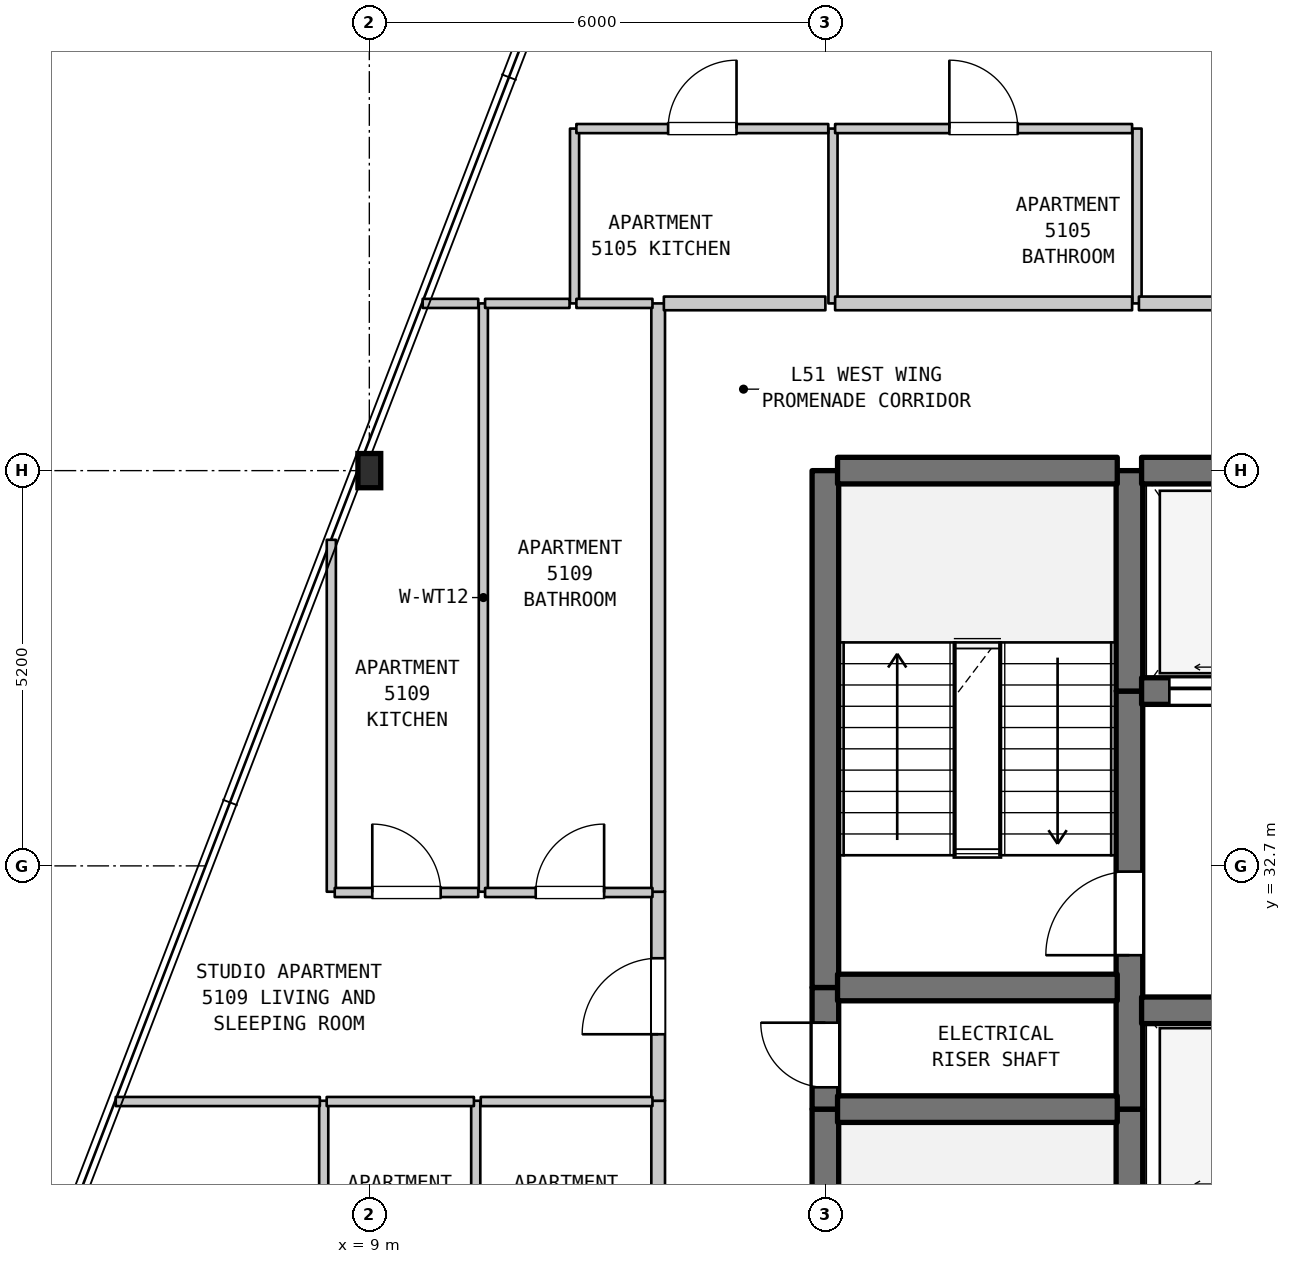
"""IFC4 building model, lengths in metres.
Left out: names, types, materials, properties, quantities, classifications, styles, units other than length and angle.
Written with IfcOpenShell. Run it as: python <this file> out.ifc"""

import sys

from ifc_helpers import new_model, si_unit, direction, frame, frame_2d, origin, origin_2d, place, context, subcontext, project, spatial, rectangle, i_section, extrude, element, fill, save


model = new_model("IFC4")
c1 = context("Model", 3, precision=1e-05, world=origin(), true_north=direction((0.0, 1.0)))
c2 = subcontext(c1, "Body", "Model", "MODEL_VIEW")
j1 = project(units=[si_unit("LENGTHUNIT", "METRE"), si_unit("PLANEANGLEUNIT", "RADIAN")], contexts=[c1])
p1 = place(None, origin())
s1 = spatial("IfcSite", under=j1, at=p1, CompositionType="ELEMENT")
p2 = place(p1, origin())
s2 = spatial("IfcBuilding", under=s1, at=p2, CompositionType="ELEMENT")
p3 = place(p2, frame((0.0, 0.0, 206.9)))
s3 = spatial("IfcBuildingStorey", under=s2, at=p3, CompositionType="ELEMENT", Elevation=206.9)
p4 = place(p3, frame((9.0, 37.9, 0.0), z_axis=(0.0, 0.0, 1.0), x_axis=(1.0, 0.0, 0.0)))
e1 = element("IfcColumn", 1, at=p4, inside=s3, PredefinedType="COLUMN", context=c2, shape_type="SweptSolid", body=[
    extrude(i_section(OverallWidth=0.3, OverallDepth=0.45, WebThickness=0.014, FlangeThickness=0.026, FilletRadius=0.027, at=origin_2d()), origin(), (0.0, 0.0, 1.0), 3.7),
])
p5 = place(p3, frame((8.4, 26.16, 0.0), z_axis=(0.0, 0.0, 1.0), x_axis=(0.0, 1.0, 0.0)))
e2 = element("IfcWall", 2, at=p5, inside=s3, PredefinedType="PARTITIONING", context=c2, shape_type="SweptSolid", body=[
    extrude(rectangle(XDim=3.45, YDim=0.12, at=frame_2d((1.725, 0.0))), origin(), (0.0, 0.0, 1.0), 3.39),
])
p6 = place(p3, frame((8.5, 32.36, 0.0), z_axis=(0.0, 0.0, 1.0), x_axis=(0.0, 1.0, 0.0)))
e3 = element("IfcWall", 3, at=p6, inside=s3, PredefinedType="PARTITIONING", context=c2, shape_type="SweptSolid", body=[
    extrude(rectangle(XDim=4.63, YDim=0.12, at=frame_2d((2.315, 0.0))), origin(), (0.0, 0.0, 1.0), 3.39),
])
p7 = place(p3, frame((10.4, 26.16, 0.0), z_axis=(0.0, 0.0, 1.0), x_axis=(0.0, 1.0, 0.0)))
e4 = element("IfcWall", 4, at=p7, inside=s3, PredefinedType="PARTITIONING", context=c2, shape_type="SweptSolid", body=[
    extrude(rectangle(XDim=3.45, YDim=0.12, at=frame_2d((1.725, 0.0))), origin(), (0.0, 0.0, 1.0), 3.39),
])
p8 = place(p3, frame((10.5, 32.36, 0.0), z_axis=(0.0, 0.0, 1.0), x_axis=(0.0, 1.0, 0.0)))
e5 = element("IfcWall", 5, at=p8, inside=s3, PredefinedType="PARTITIONING", context=c2, shape_type="SweptSolid", body=[
    extrude(rectangle(XDim=7.74, YDim=0.12, at=frame_2d((3.87, 0.0))), origin(), (0.0, 0.0, 1.0), 3.39),
])
p9 = place(p3, frame((11.7, 40.1, 0.0), z_axis=(0.0, 0.0, 1.0), x_axis=(0.0, 1.0, 0.0)))
e6 = element("IfcWall", 6, at=p9, inside=s3, PredefinedType="PARTITIONING", context=c2, shape_type="SweptSolid", body=[
    extrude(rectangle(XDim=2.3, YDim=0.12, at=frame_2d((1.15, 0.0))), origin(), (0.0, 0.0, 1.0), 3.39),
])
p10 = place(p3, frame((12.8, 26.16, 0.0), z_axis=(0.0, 0.0, 1.0), x_axis=(0.0, 1.0, 0.0)))
e7 = element("IfcWall", 7, at=p10, inside=s3, PredefinedType="STANDARD", context=c2, shape_type="SweptSolid", body=[
    extrude(rectangle(XDim=3.45, YDim=0.18, at=frame_2d((1.725, 0.0))), origin(), (0.0, 0.0, 1.0), 3.39),
])
p11 = place(p3, frame((12.8, 29.61, 0.0), z_axis=(0.0, 0.0, 1.0), x_axis=(0.0, 1.0, 0.0)))
e8 = element("IfcWall", 8, at=p11, inside=s3, PredefinedType="STANDARD", context=c2, shape_type="SweptSolid", body=[
    extrude(rectangle(XDim=2.75, YDim=0.18, at=frame_2d((1.375, 0.0))), origin(), (0.0, 0.0, 1.0), 3.39),
])
p12 = place(p11, frame((0.875, 0.0, 0.0)))
e9 = element("IfcOpeningElement", 9, at=p12, cuts=e8, PredefinedType="OPENING", context=c2, shape_type="SweptSolid", body=[
    extrude(rectangle(XDim=1.0, YDim=2.15, at=frame_2d((0.5, 1.075))), frame((0.0, 0.1, 0.0), z_axis=(0.0, -1.0, 0.0), x_axis=(1.0, 0.0, 0.0)), (0.0, 0.0, 1.0), 0.2),
])
p13 = place(p3, frame((12.8, 32.36, 0.0), z_axis=(0.0, 0.0, 1.0), x_axis=(0.0, 1.0, 0.0)))
e10 = element("IfcWall", 10, at=p13, inside=s3, PredefinedType="STANDARD", context=c2, shape_type="SweptSolid", body=[
    extrude(rectangle(XDim=7.74, YDim=0.18, at=frame_2d((3.87, 0.0))), origin(), (0.0, 0.0, 1.0), 3.39),
])
p14 = place(p3, frame((15.0, 22.7, 0.0), z_axis=(0.0, 0.0, 1.0), x_axis=(0.0, 1.0, 0.0)))
e11 = element("IfcWall", 11, at=p14, inside=s3, PredefinedType="SHEAR", context=c2, shape_type="SweptSolid", body=[
    extrude(rectangle(XDim=6.8, YDim=0.35, at=frame_2d((3.4, 0.0))), origin(), (0.0, 0.0, 1.0), 3.39),
])
p15 = place(p3, frame((15.0, 29.5, 0.0), z_axis=(0.0, 0.0, 1.0), x_axis=(0.0, 1.0, 0.0)))
e12 = element("IfcWall", 12, at=p15, inside=s3, PredefinedType="SHEAR", context=c2, shape_type="SweptSolid", body=[
    extrude(rectangle(XDim=1.6, YDim=0.35, at=frame_2d((0.8, 0.0))), origin(), (0.0, 0.0, 1.0), 3.39),
])
p16 = place(p15, frame((0.287, 0.0, 0.0)))
e13 = element("IfcOpeningElement", 13, at=p16, cuts=e12, PredefinedType="OPENING", context=c2, shape_type="SweptSolid", body=[
    extrude(rectangle(XDim=0.85, YDim=2.1, at=frame_2d((0.425, 1.05))), frame((0.0, 0.185, 0.0), z_axis=(0.0, -1.0, 0.0), x_axis=(1.0, 0.0, 0.0)), (0.0, 0.0, 1.0), 0.37),
])
p17 = place(p3, frame((15.0, 31.1, 0.0), z_axis=(0.0, 0.0, 1.0), x_axis=(0.0, 1.0, 0.0)))
e14 = element("IfcWall", 14, at=p17, inside=s3, PredefinedType="SHEAR", context=c2, shape_type="SweptSolid", body=[
    extrude(rectangle(XDim=6.8, YDim=0.35, at=frame_2d((3.4, 0.0))), origin(), (0.0, 0.0, 1.0), 3.39),
])
p18 = place(p3, frame((15.1, 40.1, 0.0), z_axis=(0.0, 0.0, 1.0), x_axis=(0.0, 1.0, 0.0)))
e15 = element("IfcWall", 15, at=p18, inside=s3, PredefinedType="PARTITIONING", context=c2, shape_type="SweptSolid", body=[
    extrude(rectangle(XDim=2.3, YDim=0.12, at=frame_2d((1.15, 0.0))), origin(), (0.0, 0.0, 1.0), 3.39),
])
p19 = place(p3, frame((19.0, 28.2, 0.0), z_axis=(0.0, 0.0, 1.0), x_axis=(0.0, 1.0, 0.0)))
e16 = element("IfcWall", 16, at=p19, inside=s3, PredefinedType="SHEAR", context=c2, shape_type="SweptSolid", body=[
    extrude(rectangle(XDim=1.3, YDim=0.35, at=frame_2d((0.65, 0.0))), origin(), (0.0, 0.0, 1.0), 3.39),
])
p20 = place(p3, frame((19.0, 29.5, 0.0), z_axis=(0.0, 0.0, 1.0), x_axis=(0.0, 1.0, 0.0)))
e17 = element("IfcWall", 17, at=p20, inside=s3, PredefinedType="SHEAR", context=c2, shape_type="SweptSolid", body=[
    extrude(rectangle(XDim=5.5, YDim=0.35, at=frame_2d((2.75, 0.0))), origin(), (0.0, 0.0, 1.0), 3.39),
])
p21 = place(p20, frame((2.025, 0.0, 0.0)))
e18 = element("IfcOpeningElement", 18, at=p21, cuts=e17, PredefinedType="OPENING", context=c2, shape_type="SweptSolid", body=[
    extrude(rectangle(XDim=1.1, YDim=2.15, at=frame_2d((0.55, 1.075))), frame((0.0, 0.185, 0.0), z_axis=(0.0, -1.0, 0.0), x_axis=(1.0, 0.0, 0.0)), (0.0, 0.0, 1.0), 0.37),
])
p22 = place(p3, frame((19.0, 35.0, 0.0), z_axis=(0.0, 0.0, 1.0), x_axis=(0.0, 1.0, 0.0)))
e19 = element("IfcWall", 19, at=p22, inside=s3, PredefinedType="SHEAR", context=c2, shape_type="SweptSolid", body=[
    extrude(rectangle(XDim=2.9, YDim=0.35, at=frame_2d((1.45, 0.0))), origin(), (0.0, 0.0, 1.0), 3.39),
])
p23 = place(p3, frame((19.1, 40.1, 0.0), z_axis=(0.0, 0.0, 1.0), x_axis=(0.0, 1.0, 0.0)))
e20 = element("IfcWall", 20, at=p23, inside=s3, PredefinedType="PARTITIONING", context=c2, shape_type="SweptSolid", body=[
    extrude(rectangle(XDim=2.3, YDim=0.12, at=frame_2d((1.15, 0.0))), origin(), (0.0, 0.0, 1.0), 3.39),
])
p24 = place(p3, frame((15.16, 29.5, 0.0), z_axis=(0.0, 0.0, 1.0), x_axis=(1.0, 0.0, 0.0)))
e21 = element("IfcWall", 21, at=p24, inside=s3, PredefinedType="SHEAR", context=c2, shape_type="SweptSolid", body=[
    extrude(rectangle(XDim=3.68, YDim=0.35, at=frame_2d((1.84, 0.0))), origin(), (0.0, 0.0, 1.0), 3.39),
])
p25 = place(p3, frame((5.664, 29.6, 0.0), z_axis=(0.0, 0.0, 1.0), x_axis=(1.0, 0.0, 0.0)))
e22 = element("IfcWall", 22, at=p25, inside=s3, PredefinedType="PARTITIONING", context=c2, shape_type="SweptSolid", body=[
    extrude(rectangle(XDim=2.685, YDim=0.12, at=frame_2d((1.343, 0.0))), origin(), (0.0, 0.0, 1.0), 3.39),
])
p26 = place(p3, frame((8.439, 29.6, 0.0), z_axis=(0.0, 0.0, 1.0), x_axis=(1.0, 0.0, 0.0)))
e23 = element("IfcWall", 23, at=p26, inside=s3, PredefinedType="PARTITIONING", context=c2, shape_type="SweptSolid", body=[
    extrude(rectangle(XDim=1.937, YDim=0.12, at=frame_2d((0.969, 0.0))), origin(), (0.0, 0.0, 1.0), 3.39),
])
p27 = place(p3, frame((10.466, 29.6, 0.0), z_axis=(0.0, 0.0, 1.0), x_axis=(1.0, 0.0, 0.0)))
e24 = element("IfcWall", 24, at=p27, inside=s3, PredefinedType="PARTITIONING", context=c2, shape_type="SweptSolid", body=[
    extrude(rectangle(XDim=2.259, YDim=0.12, at=frame_2d((1.129, 0.0))), origin(), (0.0, 0.0, 1.0), 3.39),
])
p28 = place(p3, frame((19.16, 30.8, 0.0), z_axis=(0.0, 0.0, 1.0), x_axis=(1.0, 0.0, 0.0)))
e25 = element("IfcWall", 25, at=p28, inside=s3, PredefinedType="SHEAR", context=c2, shape_type="SweptSolid", body=[
    extrude(rectangle(XDim=4.48, YDim=0.35, at=frame_2d((2.24, 0.0))), origin(), (0.0, 0.0, 1.0), 3.39),
])
p29 = place(p3, frame((15.16, 31.1, 0.0), z_axis=(0.0, 0.0, 1.0), x_axis=(1.0, 0.0, 0.0)))
e26 = element("IfcWall", 26, at=p29, inside=s3, PredefinedType="SHEAR", context=c2, shape_type="SweptSolid", body=[
    extrude(rectangle(XDim=3.68, YDim=0.35, at=frame_2d((1.84, 0.0))), origin(), (0.0, 0.0, 1.0), 3.39),
])
p30 = place(p3, frame((8.545, 32.35, 0.0), z_axis=(0.0, 0.0, 1.0), x_axis=(1.0, 0.0, 0.0)))
e27 = element("IfcWall", 27, at=p30, inside=s3, PredefinedType="PARTITIONING", context=c2, shape_type="SweptSolid", body=[
    extrude(rectangle(XDim=1.888, YDim=0.12, at=frame_2d((0.944, 0.0))), origin(), (0.0, 0.0, 1.0), 3.39),
])
p31 = place(p30, frame((0.494, 0.0, 0.0)))
e28 = element("IfcOpeningElement", 28, at=p31, cuts=e27, PredefinedType="OPENING", context=c2, shape_type="SweptSolid", body=[
    extrude(rectangle(XDim=0.9, YDim=2.15, at=frame_2d((0.45, 1.075))), frame((0.0, 0.07, 0.0), z_axis=(0.0, -1.0, 0.0), x_axis=(1.0, 0.0, 0.0)), (0.0, 0.0, 1.0), 0.14),
])
p32 = place(p3, frame((10.523, 32.35, 0.0), z_axis=(0.0, 0.0, 1.0), x_axis=(1.0, 0.0, 0.0)))
e29 = element("IfcWall", 29, at=p32, inside=s3, PredefinedType="PARTITIONING", context=c2, shape_type="SweptSolid", body=[
    extrude(rectangle(XDim=2.202, YDim=0.12, at=frame_2d((1.101, 0.0))), origin(), (0.0, 0.0, 1.0), 3.39),
])
p33 = place(p32, frame((0.666, 0.0, 0.0)))
e30 = element("IfcOpeningElement", 30, at=p33, cuts=e29, PredefinedType="OPENING", context=c2, shape_type="SweptSolid", body=[
    extrude(rectangle(XDim=0.9, YDim=2.1, at=frame_2d((0.45, 1.05))), frame((0.0, 0.07, 0.0), z_axis=(0.0, -1.0, 0.0), x_axis=(1.0, 0.0, 0.0)), (0.0, 0.0, 1.0), 0.14),
])
p34 = place(p3, frame((19.16, 35.0, 0.0), z_axis=(0.0, 0.0, 1.0), x_axis=(1.0, 0.0, 0.0)))
e31 = element("IfcWall", 31, at=p34, inside=s3, PredefinedType="SHEAR", context=c2, shape_type="SweptSolid", body=[
    extrude(rectangle(XDim=4.48, YDim=0.35, at=frame_2d((2.24, 0.0))), origin(), (0.0, 0.0, 1.0), 3.39),
])
p35 = place(p34, frame((0.365, 0.0, 0.0)))
e32 = element("IfcOpeningElement", 32, at=p35, cuts=e31, PredefinedType="OPENING", context=c2, shape_type="SweptSolid", body=[
    extrude(rectangle(XDim=1.35, YDim=2.2, at=frame_2d((0.675, 1.1))), frame((0.0, 0.185, 0.0), z_axis=(0.0, -1.0, 0.0), x_axis=(1.0, 0.0, 0.0)), (0.0, 0.0, 1.0), 0.37),
])
p36 = place(p34, frame((2.765, 0.0, 0.0)))
e33 = element("IfcOpeningElement", 33, at=p36, cuts=e31, PredefinedType="OPENING", context=c2, shape_type="SweptSolid", body=[
    extrude(rectangle(XDim=1.35, YDim=2.2, at=frame_2d((0.675, 1.1))), frame((0.0, 0.185, 0.0), z_axis=(0.0, -1.0, 0.0), x_axis=(1.0, 0.0, 0.0)), (0.0, 0.0, 1.0), 0.37),
])
p37 = place(p3, frame((15.16, 37.9, 0.0), z_axis=(0.0, 0.0, 1.0), x_axis=(1.0, 0.0, 0.0)))
e34 = element("IfcWall", 34, at=p37, inside=s3, PredefinedType="SHEAR", context=c2, shape_type="SweptSolid", body=[
    extrude(rectangle(XDim=3.68, YDim=0.35, at=frame_2d((1.84, 0.0))), origin(), (0.0, 0.0, 1.0), 3.39),
])
p38 = place(p3, frame((19.16, 37.9, 0.0), z_axis=(0.0, 0.0, 1.0), x_axis=(1.0, 0.0, 0.0)))
e35 = element("IfcWall", 35, at=p38, inside=s3, PredefinedType="SHEAR", context=c2, shape_type="SweptSolid", body=[
    extrude(rectangle(XDim=4.48, YDim=0.35, at=frame_2d((2.24, 0.0))), origin(), (0.0, 0.0, 1.0), 3.39),
])
p39 = place(p3, frame((9.702, 40.1, 0.0), z_axis=(0.0, 0.0, 1.0), x_axis=(1.0, 0.0, 0.0)))
e36 = element("IfcWall", 36, at=p39, inside=s3, PredefinedType="PARTITIONING", context=c2, shape_type="SweptSolid", body=[
    extrude(rectangle(XDim=0.731, YDim=0.12, at=frame_2d((0.366, 0.0))), origin(), (0.0, 0.0, 1.0), 3.39),
])
p40 = place(p3, frame((10.523, 40.1, 0.0), z_axis=(0.0, 0.0, 1.0), x_axis=(1.0, 0.0, 0.0)))
e37 = element("IfcWall", 37, at=p40, inside=s3, PredefinedType="PARTITIONING", context=c2, shape_type="SweptSolid", body=[
    extrude(rectangle(XDim=1.111, YDim=0.12, at=frame_2d((0.556, 0.0))), origin(), (0.0, 0.0, 1.0), 3.39),
])
p41 = place(p3, frame((11.724, 40.1, 0.0), z_axis=(0.0, 0.0, 1.0), x_axis=(1.0, 0.0, 0.0)))
e38 = element("IfcWall", 38, at=p41, inside=s3, PredefinedType="PARTITIONING", context=c2, shape_type="SweptSolid", body=[
    extrude(rectangle(XDim=1.001, YDim=0.12, at=frame_2d((0.5, 0.0))), origin(), (0.0, 0.0, 1.0), 3.39),
])
p42 = place(p3, frame((12.875, 40.1, 0.0), z_axis=(0.0, 0.0, 1.0), x_axis=(1.0, 0.0, 0.0)))
e39 = element("IfcWall", 39, at=p42, inside=s3, PredefinedType="STANDARD", context=c2, shape_type="SweptSolid", body=[
    extrude(rectangle(XDim=2.125, YDim=0.18, at=frame_2d((1.062, 0.0))), origin(), (0.0, 0.0, 1.0), 3.39),
])
p43 = place(p3, frame((15.128, 40.1, 0.0), z_axis=(0.0, 0.0, 1.0), x_axis=(1.0, 0.0, 0.0)))
e40 = element("IfcWall", 40, at=p43, inside=s3, PredefinedType="STANDARD", context=c2, shape_type="SweptSolid", body=[
    extrude(rectangle(XDim=3.907, YDim=0.18, at=frame_2d((1.954, 0.0))), origin(), (0.0, 0.0, 1.0), 3.39),
])
p44 = place(p3, frame((19.125, 40.1, 0.0), z_axis=(0.0, 0.0, 1.0), x_axis=(1.0, 0.0, 0.0)))
e41 = element("IfcWall", 41, at=p44, inside=s3, PredefinedType="STANDARD", context=c2, shape_type="SweptSolid", body=[
    extrude(rectangle(XDim=10.345, YDim=0.18, at=frame_2d((5.172, 0.0))), origin(), (0.0, 0.0, 1.0), 3.39),
])
p45 = place(p44, frame((2.035, 0.0, 0.0)))
e42 = element("IfcOpeningElement", 42, at=p45, cuts=e41, PredefinedType="OPENING", context=c2, shape_type="SweptSolid", body=[
    extrude(rectangle(XDim=1.0, YDim=2.15, at=frame_2d((0.5, 1.075))), frame((0.0, 0.1, 0.0), z_axis=(0.0, -1.0, 0.0), x_axis=(1.0, 0.0, 0.0)), (0.0, 0.0, 1.0), 0.2),
])
p46 = place(p44, frame((7.235, 0.0, 0.0)))
e43 = element("IfcOpeningElement", 43, at=p46, cuts=e41, PredefinedType="OPENING", context=c2, shape_type="SweptSolid", body=[
    extrude(rectangle(XDim=1.0, YDim=2.15, at=frame_2d((0.5, 1.075))), frame((0.0, 0.1, 0.0), z_axis=(0.0, -1.0, 0.0), x_axis=(1.0, 0.0, 0.0)), (0.0, 0.0, 1.0), 0.2),
])
p47 = place(p3, frame((11.724, 42.4, 0.0), z_axis=(0.0, 0.0, 1.0), x_axis=(1.0, 0.0, 0.0)))
e44 = element("IfcWall", 44, at=p47, inside=s3, PredefinedType="PARTITIONING", context=c2, shape_type="SweptSolid", body=[
    extrude(rectangle(XDim=3.314, YDim=0.12, at=frame_2d((1.657, 0.0))), origin(), (0.0, 0.0, 1.0), 3.39),
])
p48 = place(p47, frame((1.207, 0.0, 0.0)))
e45 = element("IfcOpeningElement", 45, at=p48, cuts=e44, PredefinedType="OPENING", context=c2, shape_type="SweptSolid", body=[
    extrude(rectangle(XDim=0.9, YDim=2.15, at=frame_2d((0.45, 1.075))), frame((0.0, 0.07, 0.0), z_axis=(0.0, -1.0, 0.0), x_axis=(1.0, 0.0, 0.0)), (0.0, 0.0, 1.0), 0.14),
])
p49 = place(p3, frame((15.128, 42.4, 0.0), z_axis=(0.0, 0.0, 1.0), x_axis=(1.0, 0.0, 0.0)))
e46 = element("IfcWall", 46, at=p49, inside=s3, PredefinedType="PARTITIONING", context=c2, shape_type="SweptSolid", body=[
    extrude(rectangle(XDim=3.907, YDim=0.12, at=frame_2d((1.954, 0.0))), origin(), (0.0, 0.0, 1.0), 3.39),
])
p50 = place(p49, frame((1.503, 0.0, 0.0)))
e47 = element("IfcOpeningElement", 47, at=p50, cuts=e46, PredefinedType="OPENING", context=c2, shape_type="SweptSolid", body=[
    extrude(rectangle(XDim=0.9, YDim=2.1, at=frame_2d((0.45, 1.05))), frame((0.0, 0.07, 0.0), z_axis=(0.0, -1.0, 0.0), x_axis=(1.0, 0.0, 0.0)), (0.0, 0.0, 1.0), 0.14),
])
p51 = place(p12, origin())
e48 = element("IfcDoor", 48, at=p51, inside=s3, OperationType="SINGLE_SWING_LEFT", PredefinedType="DOOR", context=c2, shape_type="SweptSolid", body=[
    extrude(rectangle(XDim=1.0, YDim=2.15, at=frame_2d((0.5, 1.075))), frame((0.0, 0.025, 0.0), z_axis=(0.0, -1.0, 0.0), x_axis=(1.0, 0.0, 0.0)), (0.0, 0.0, 1.0), 0.05),
])
fill(e9, e48)
p52 = place(p16, origin())
e49 = element("IfcDoor", 49, at=p52, inside=s3, OperationType="SINGLE_SWING_RIGHT", PredefinedType="DOOR", context=c2, shape_type="SweptSolid", body=[
    extrude(rectangle(XDim=0.85, YDim=2.1, at=frame_2d((0.425, 1.05))), frame((0.0, 0.025, 0.0), z_axis=(0.0, -1.0, 0.0), x_axis=(1.0, 0.0, 0.0)), (0.0, 0.0, 1.0), 0.05),
])
fill(e13, e49)
p53 = place(p21, origin())
e50 = element("IfcDoor", 50, at=p53, inside=s3, OperationType="SINGLE_SWING_LEFT", PredefinedType="DOOR", context=c2, shape_type="SweptSolid", body=[
    extrude(rectangle(XDim=1.1, YDim=2.15, at=frame_2d((0.55, 1.075))), frame((0.0, 0.025, 0.0), z_axis=(0.0, -1.0, 0.0), x_axis=(1.0, 0.0, 0.0)), (0.0, 0.0, 1.0), 0.05),
])
fill(e18, e50)
p54 = place(p31, origin())
e51 = element("IfcDoor", 51, at=p54, inside=s3, OperationType="SINGLE_SWING_LEFT", PredefinedType="DOOR", context=c2, shape_type="SweptSolid", body=[
    extrude(rectangle(XDim=0.9, YDim=2.15, at=frame_2d((0.45, 1.075))), frame((0.0, 0.025, 0.0), z_axis=(0.0, -1.0, 0.0), x_axis=(1.0, 0.0, 0.0)), (0.0, 0.0, 1.0), 0.05),
])
fill(e28, e51)
p55 = place(p33, origin())
e52 = element("IfcDoor", 52, at=p55, inside=s3, OperationType="SINGLE_SWING_RIGHT", PredefinedType="DOOR", context=c2, shape_type="SweptSolid", body=[
    extrude(rectangle(XDim=0.9, YDim=2.1, at=frame_2d((0.45, 1.05))), frame((0.0, 0.025, 0.0), z_axis=(0.0, -1.0, 0.0), x_axis=(1.0, 0.0, 0.0)), (0.0, 0.0, 1.0), 0.05),
])
fill(e30, e52)
p56 = place(p35, origin())
e53 = element("IfcDoor", 53, at=p56, inside=s3, OperationType="DOUBLE_DOOR_SLIDING", PredefinedType="DOOR", context=c2, shape_type="SweptSolid", body=[
    extrude(rectangle(XDim=1.35, YDim=2.2, at=frame_2d((0.675, 1.1))), frame((0.0, 0.025, 0.0), z_axis=(0.0, -1.0, 0.0), x_axis=(1.0, 0.0, 0.0)), (0.0, 0.0, 1.0), 0.05),
])
fill(e32, e53)
p57 = place(p48, origin())
e54 = element("IfcDoor", 54, at=p57, inside=s3, OperationType="SINGLE_SWING_RIGHT", PredefinedType="DOOR", context=c2, shape_type="SweptSolid", body=[
    extrude(rectangle(XDim=0.9, YDim=2.15, at=frame_2d((0.45, 1.075))), frame((0.0, 0.025, 0.0), z_axis=(0.0, -1.0, 0.0), x_axis=(1.0, 0.0, 0.0)), (0.0, 0.0, 1.0), 0.05),
])
fill(e45, e54)
p58 = place(p50, origin())
e55 = element("IfcDoor", 55, at=p58, inside=s3, OperationType="SINGLE_SWING_LEFT", PredefinedType="DOOR", context=c2, shape_type="SweptSolid", body=[
    extrude(rectangle(XDim=0.9, YDim=2.1, at=frame_2d((0.45, 1.05))), frame((0.0, 0.025, 0.0), z_axis=(0.0, -1.0, 0.0), x_axis=(1.0, 0.0, 0.0)), (0.0, 0.0, 1.0), 0.05),
])
fill(e47, e55)
save(model, sys.argv[1])
